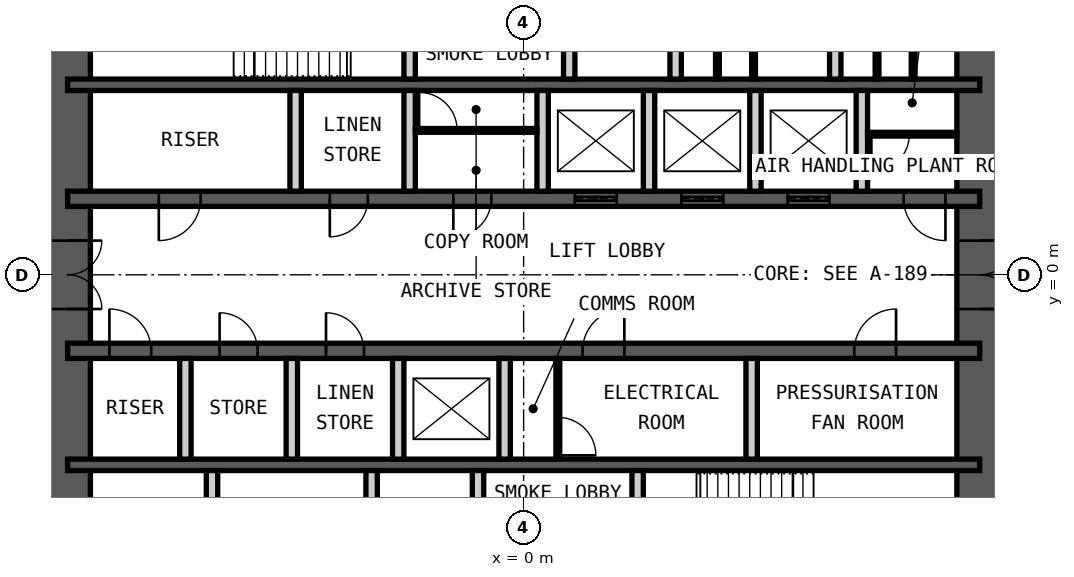
"""IFC4 building model, lengths in metres.
Left out: names, types, materials, properties, quantities, classifications, styles, units other than length and angle.
Written with IfcOpenShell. Run it as: python <this file> out.ifc"""

import sys

from ifc_helpers import new_model, si_unit, direction, frame, frame_2d, origin, place, context, subcontext, project, spatial, rectangle, extrude, element, fill, save


model = new_model("IFC4")
c1 = context("Model", 3, precision=1e-05, world=origin(), true_north=direction((0.0, 1.0)))
c2 = subcontext(c1, "Body", "Model", "MODEL_VIEW")
j1 = project(units=[si_unit("LENGTHUNIT", "METRE"), si_unit("PLANEANGLEUNIT", "RADIAN")], contexts=[c1])
p1 = place(None, origin())
s1 = spatial("IfcSite", under=j1, at=p1, CompositionType="ELEMENT")
p2 = place(p1, origin())
s2 = spatial("IfcBuilding", under=s1, at=p2, CompositionType="ELEMENT")
p3 = place(p2, frame((0.0, 0.0, 209.8)))
s3 = spatial("IfcBuildingStorey", under=s2, at=p3, CompositionType="ELEMENT", Elevation=209.8)
p4 = place(p3, frame((12.0, -9.0, 0.0), z_axis=(0.0, 0.0, 1.0), x_axis=(0.0, 1.0, 0.0)))
e1 = element("IfcWall", 1, at=p4, inside=s3, PredefinedType="SHEAR", context=c2, shape_type="SweptSolid", body=[
    extrude(rectangle(XDim=18.0, YDim=1.2, at=frame_2d((9.0, 0.0))), origin(), (0.0, 0.0, 1.0), 4.2),
])
p5 = place(p4, frame((8.1, 0.0, 0.0)))
e2 = element("IfcOpeningElement", 2, at=p5, cuts=e1, PredefinedType="OPENING", context=c2, shape_type="SweptSolid", body=[
    extrude(rectangle(XDim=1.8, YDim=2.1, at=frame_2d((0.9, 1.05))), frame((0.0, 0.61, 0.0), z_axis=(0.0, -1.0, 0.0), x_axis=(1.0, 0.0, 0.0)), (0.0, 0.0, 1.0), 1.22),
])
p6 = place(p3, frame((-12.0, -9.0, 0.0), z_axis=(0.0, 0.0, 1.0), x_axis=(0.0, 1.0, 0.0)))
e3 = element("IfcWall", 3, at=p6, inside=s3, PredefinedType="SHEAR", context=c2, shape_type="SweptSolid", body=[
    extrude(rectangle(XDim=18.0, YDim=1.2, at=frame_2d((9.0, 0.0))), origin(), (0.0, 0.0, 1.0), 4.2),
])
p7 = place(p6, frame((8.1, 0.0, 0.0)))
e4 = element("IfcOpeningElement", 4, at=p7, cuts=e3, PredefinedType="OPENING", context=c2, shape_type="SweptSolid", body=[
    extrude(rectangle(XDim=1.8, YDim=2.1, at=frame_2d((0.9, 1.05))), frame((0.0, 0.61, 0.0), z_axis=(0.0, -1.0, 0.0), x_axis=(1.0, 0.0, 0.0)), (0.0, 0.0, 1.0), 1.22),
])
p8 = place(p3, frame((-12.0, 5.0, 0.0), z_axis=(0.0, 0.0, 1.0), x_axis=(1.0, 0.0, 0.0)))
e5 = element("IfcWall", 5, at=p8, inside=s3, PredefinedType="SHEAR", context=c2, shape_type="SweptSolid", body=[
    extrude(rectangle(XDim=24.0, YDim=0.3, at=frame_2d((12.0, 0.0))), origin(), (0.0, 0.0, 1.0), 4.2),
])
p9 = place(p3, frame((-12.0, 2.0, 0.0), z_axis=(0.0, 0.0, 1.0), x_axis=(1.0, 0.0, 0.0)))
e6 = element("IfcWall", 6, at=p9, inside=s3, PredefinedType="SHEAR", context=c2, shape_type="SweptSolid", body=[
    extrude(rectangle(XDim=24.0, YDim=0.4, at=frame_2d((12.0, 0.0))), origin(), (0.0, 0.0, 1.0), 4.2),
])
p10 = place(p9, frame((2.4, 0.0, 0.0)))
e7 = element("IfcOpeningElement", 7, at=p10, cuts=e6, PredefinedType="OPENING", context=c2, shape_type="SweptSolid", body=[
    extrude(rectangle(XDim=1.1, YDim=2.1, at=frame_2d((0.55, 1.05))), frame((0.0, 0.21, 0.0), z_axis=(0.0, -1.0, 0.0), x_axis=(1.0, 0.0, 0.0)), (0.0, 0.0, 1.0), 0.42),
])
p11 = place(p9, frame((22.0, 0.0, 0.0)))
e8 = element("IfcOpeningElement", 8, at=p11, cuts=e6, PredefinedType="OPENING", context=c2, shape_type="SweptSolid", body=[
    extrude(rectangle(XDim=1.1, YDim=2.1, at=frame_2d((0.55, 1.05))), frame((0.0, 0.21, 0.0), z_axis=(0.0, -1.0, 0.0), x_axis=(1.0, 0.0, 0.0)), (0.0, 0.0, 1.0), 0.42),
])
p12 = place(p9, frame((10.15, 0.0, 0.0)))
e9 = element("IfcOpeningElement", 9, at=p12, cuts=e6, PredefinedType="OPENING", context=c2, shape_type="SweptSolid", body=[
    extrude(rectangle(XDim=1.0, YDim=2.1, at=frame_2d((0.5, 1.05))), frame((0.0, 0.21, 0.0), z_axis=(0.0, -1.0, 0.0), x_axis=(1.0, 0.0, 0.0)), (0.0, 0.0, 1.0), 0.42),
])
p13 = place(p9, frame((6.9, 0.0, 0.0)))
e10 = element("IfcOpeningElement", 10, at=p13, cuts=e6, PredefinedType="OPENING", context=c2, shape_type="SweptSolid", body=[
    extrude(rectangle(XDim=1.0, YDim=2.1, at=frame_2d((0.5, 1.05))), frame((0.0, 0.21, 0.0), z_axis=(0.0, -1.0, 0.0), x_axis=(1.0, 0.0, 0.0)), (0.0, 0.0, 1.0), 0.42),
])
p14 = place(p9, frame((13.35, 0.0, 0.0)))
e11 = element("IfcOpeningElement", 11, at=p14, cuts=e6, PredefinedType="OPENING", context=c2, shape_type="SweptSolid", body=[
    extrude(rectangle(XDim=1.1, YDim=2.4, at=frame_2d((0.55, 1.2))), frame((0.0, 0.21, 0.0), z_axis=(0.0, -1.0, 0.0), x_axis=(1.0, 0.0, 0.0)), (0.0, 0.0, 1.0), 0.42),
])
p15 = place(p9, frame((16.15, 0.0, 0.0)))
e12 = element("IfcOpeningElement", 12, at=p15, cuts=e6, PredefinedType="OPENING", context=c2, shape_type="SweptSolid", body=[
    extrude(rectangle(XDim=1.1, YDim=2.4, at=frame_2d((0.55, 1.2))), frame((0.0, 0.21, 0.0), z_axis=(0.0, -1.0, 0.0), x_axis=(1.0, 0.0, 0.0)), (0.0, 0.0, 1.0), 0.42),
])
p16 = place(p9, frame((18.95, 0.0, 0.0)))
e13 = element("IfcOpeningElement", 13, at=p16, cuts=e6, PredefinedType="OPENING", context=c2, shape_type="SweptSolid", body=[
    extrude(rectangle(XDim=1.1, YDim=2.4, at=frame_2d((0.55, 1.2))), frame((0.0, 0.21, 0.0), z_axis=(0.0, -1.0, 0.0), x_axis=(1.0, 0.0, 0.0)), (0.0, 0.0, 1.0), 0.42),
])
p17 = place(p3, frame((-12.0, -2.0, 0.0), z_axis=(0.0, 0.0, 1.0), x_axis=(1.0, 0.0, 0.0)))
e14 = element("IfcWall", 14, at=p17, inside=s3, PredefinedType="SHEAR", context=c2, shape_type="SweptSolid", body=[
    extrude(rectangle(XDim=24.0, YDim=0.4, at=frame_2d((12.0, 0.0))), origin(), (0.0, 0.0, 1.0), 4.2),
])
p18 = place(p17, frame((1.1, 0.0, 0.0)))
e15 = element("IfcOpeningElement", 15, at=p18, cuts=e14, PredefinedType="OPENING", context=c2, shape_type="SweptSolid", body=[
    extrude(rectangle(XDim=1.1, YDim=2.1, at=frame_2d((0.55, 1.05))), frame((0.0, 0.21, 0.0), z_axis=(0.0, -1.0, 0.0), x_axis=(1.0, 0.0, 0.0)), (0.0, 0.0, 1.0), 0.42),
])
p19 = place(p17, frame((13.55, 0.0, 0.0)))
e16 = element("IfcOpeningElement", 16, at=p19, cuts=e14, PredefinedType="OPENING", context=c2, shape_type="SweptSolid", body=[
    extrude(rectangle(XDim=1.1, YDim=2.1, at=frame_2d((0.55, 1.05))), frame((0.0, 0.21, 0.0), z_axis=(0.0, -1.0, 0.0), x_axis=(1.0, 0.0, 0.0)), (0.0, 0.0, 1.0), 0.42),
])
p20 = place(p17, frame((20.7, 0.0, 0.0)))
e17 = element("IfcOpeningElement", 17, at=p20, cuts=e14, PredefinedType="OPENING", context=c2, shape_type="SweptSolid", body=[
    extrude(rectangle(XDim=1.1, YDim=2.1, at=frame_2d((0.55, 1.05))), frame((0.0, 0.21, 0.0), z_axis=(0.0, -1.0, 0.0), x_axis=(1.0, 0.0, 0.0)), (0.0, 0.0, 1.0), 0.42),
])
p21 = place(p17, frame((4.0, 0.0, 0.0)))
e18 = element("IfcOpeningElement", 18, at=p21, cuts=e14, PredefinedType="OPENING", context=c2, shape_type="SweptSolid", body=[
    extrude(rectangle(XDim=1.0, YDim=2.1, at=frame_2d((0.5, 1.05))), frame((0.0, 0.21, 0.0), z_axis=(0.0, -1.0, 0.0), x_axis=(1.0, 0.0, 0.0)), (0.0, 0.0, 1.0), 0.42),
])
p22 = place(p17, frame((6.8, 0.0, 0.0)))
e19 = element("IfcOpeningElement", 19, at=p22, cuts=e14, PredefinedType="OPENING", context=c2, shape_type="SweptSolid", body=[
    extrude(rectangle(XDim=1.0, YDim=2.1, at=frame_2d((0.5, 1.05))), frame((0.0, 0.21, 0.0), z_axis=(0.0, -1.0, 0.0), x_axis=(1.0, 0.0, 0.0)), (0.0, 0.0, 1.0), 0.42),
])
p23 = place(p3, frame((-12.0, -5.0, 0.0), z_axis=(0.0, 0.0, 1.0), x_axis=(1.0, 0.0, 0.0)))
e20 = element("IfcWall", 20, at=p23, inside=s3, PredefinedType="SHEAR", context=c2, shape_type="SweptSolid", body=[
    extrude(rectangle(XDim=24.0, YDim=0.3, at=frame_2d((12.0, 0.0))), origin(), (0.0, 0.0, 1.0), 4.2),
])
p24 = place(p3, frame((-3.0, 5.15, 0.0), z_axis=(0.0, 0.0, 1.0), x_axis=(0.0, 1.0, 0.0)))
e21 = element("IfcWall", 21, at=p24, inside=s3, PredefinedType="PARTITIONING", context=c2, shape_type="SweptSolid", body=[
    extrude(rectangle(XDim=3.85, YDim=0.3, at=frame_2d((1.925, 0.0))), origin(), (0.0, 0.0, 1.0), 3.98),
])
p25 = place(p24, frame((1.425, 0.0, 0.0)))
e22 = element("IfcOpeningElement", 22, at=p25, cuts=e21, PredefinedType="OPENING", context=c2, shape_type="SweptSolid", body=[
    extrude(rectangle(XDim=1.0, YDim=2.1, at=frame_2d((0.5, 1.05))), frame((0.0, 0.16, 0.0), z_axis=(0.0, -1.0, 0.0), x_axis=(1.0, 0.0, 0.0)), (0.0, 0.0, 1.0), 0.32),
])
p26 = place(p3, frame((1.2, 5.15, 0.0), z_axis=(0.0, 0.0, 1.0), x_axis=(0.0, 1.0, 0.0)))
e23 = element("IfcWall", 23, at=p26, inside=s3, PredefinedType="PARTITIONING", context=c2, shape_type="SweptSolid", body=[
    extrude(rectangle(XDim=3.85, YDim=0.3, at=frame_2d((1.925, 0.0))), origin(), (0.0, 0.0, 1.0), 3.98),
])
p27 = place(p26, frame((1.375, 0.0, 0.0)))
e24 = element("IfcOpeningElement", 24, at=p27, cuts=e23, PredefinedType="OPENING", context=c2, shape_type="SweptSolid", body=[
    extrude(rectangle(XDim=1.1, YDim=2.4, at=frame_2d((0.55, 1.2))), frame((0.0, 0.16, 0.0), z_axis=(0.0, -1.0, 0.0), x_axis=(1.0, 0.0, 0.0)), (0.0, 0.0, 1.0), 0.32),
])
for number, where, z_axis, x_axis in (
    (25, (4.0, 5.15, 0.0), (0.0, 0.0, 1.0), (0.0, 1.0, 0.0)),
    (26, (8.2, 5.15, 0.0), (0.0, 0.0, 1.0), (0.0, 1.0, 0.0)),
):
    element("IfcWall", number, at=place(p3, frame(where, z_axis=z_axis, x_axis=x_axis)), inside=s3, PredefinedType="PARTITIONING", context=c2, shape_type="SweptSolid", body=[
        extrude(rectangle(XDim=3.85, YDim=0.3, at=frame_2d((1.925, 0.0))), origin(), (0.0, 0.0, 1.0), 3.98),
    ])
for number, where, z_axis, x_axis in (
    (27, (-6.0, 2.2, 0.0), (0.0, 0.0, 1.0), (0.0, 1.0, 0.0)),
    (28, (-3.0, 2.2, 0.0), (0.0, 0.0, 1.0), (0.0, 1.0, 0.0)),
    (29, (0.5, 2.2, 0.0), (0.0, 0.0, 1.0), (0.0, 1.0, 0.0)),
    (30, (3.3, 2.2, 0.0), (0.0, 0.0, 1.0), (0.0, 1.0, 0.0)),
    (31, (6.1, 2.2, 0.0), (0.0, 0.0, 1.0), (0.0, 1.0, 0.0)),
    (32, (8.9, 2.2, 0.0), (0.0, 0.0, 1.0), (0.0, 1.0, 0.0)),
    (33, (-8.9, -4.85, 0.0), (0.0, 0.0, 1.0), (0.0, 1.0, 0.0)),
    (34, (-6.1, -4.85, 0.0), (0.0, 0.0, 1.0), (0.0, 1.0, 0.0)),
    (35, (-3.3, -4.85, 0.0), (0.0, 0.0, 1.0), (0.0, 1.0, 0.0)),
    (36, (-0.5, -4.85, 0.0), (0.0, 0.0, 1.0), (0.0, 1.0, 0.0)),
    (37, (6.0, -4.85, 0.0), (0.0, 0.0, 1.0), (0.0, 1.0, 0.0)),
):
    element("IfcWall", number, at=place(p3, frame(where, z_axis=z_axis, x_axis=x_axis)), inside=s3, PredefinedType="PARTITIONING", context=c2, shape_type="SweptSolid", body=[
        extrude(rectangle(XDim=2.65, YDim=0.3, at=frame_2d((1.325, 0.0))), origin(), (0.0, 0.0, 1.0), 3.98),
    ])
for number, where, z_axis, x_axis in (
    (38, (-8.2, -9.0, 0.0), (0.0, 0.0, 1.0), (0.0, 1.0, 0.0)),
    (39, (-4.0, -9.0, 0.0), (0.0, 0.0, 1.0), (0.0, 1.0, 0.0)),
):
    element("IfcWall", number, at=place(p3, frame(where, z_axis=z_axis, x_axis=x_axis)), inside=s3, PredefinedType="PARTITIONING", context=c2, shape_type="SweptSolid", body=[
        extrude(rectangle(XDim=3.85, YDim=0.3, at=frame_2d((1.925, 0.0))), origin(), (0.0, 0.0, 1.0), 3.98),
    ])
p28 = place(p3, frame((-1.2, -9.0, 0.0), z_axis=(0.0, 0.0, 1.0), x_axis=(0.0, 1.0, 0.0)))
e40 = element("IfcWall", 40, at=p28, inside=s3, PredefinedType="PARTITIONING", context=c2, shape_type="SweptSolid", body=[
    extrude(rectangle(XDim=3.85, YDim=0.3, at=frame_2d((1.925, 0.0))), origin(), (0.0, 0.0, 1.0), 3.98),
])
p29 = place(p28, frame((1.375, 0.0, 0.0)))
e41 = element("IfcOpeningElement", 41, at=p29, cuts=e40, PredefinedType="OPENING", context=c2, shape_type="SweptSolid", body=[
    extrude(rectangle(XDim=1.1, YDim=2.4, at=frame_2d((0.55, 1.2))), frame((0.0, 0.16, 0.0), z_axis=(0.0, -1.0, 0.0), x_axis=(1.0, 0.0, 0.0)), (0.0, 0.0, 1.0), 0.32),
])
p30 = place(p3, frame((3.0, -9.0, 0.0), z_axis=(0.0, 0.0, 1.0), x_axis=(0.0, 1.0, 0.0)))
e42 = element("IfcWall", 42, at=p30, inside=s3, PredefinedType="PARTITIONING", context=c2, shape_type="SweptSolid", body=[
    extrude(rectangle(XDim=3.85, YDim=0.3, at=frame_2d((1.925, 0.0))), origin(), (0.0, 0.0, 1.0), 3.98),
])
p31 = place(p30, frame((1.425, 0.0, 0.0)))
e43 = element("IfcOpeningElement", 43, at=p31, cuts=e42, PredefinedType="OPENING", context=c2, shape_type="SweptSolid", body=[
    extrude(rectangle(XDim=1.0, YDim=2.1, at=frame_2d((0.5, 1.05))), frame((0.0, 0.16, 0.0), z_axis=(0.0, -1.0, 0.0), x_axis=(1.0, 0.0, 0.0)), (0.0, 0.0, 1.0), 0.32),
])
p32 = place(p3, frame((-2.85, 3.8, 0.0), z_axis=(0.0, 0.0, 1.0), x_axis=(1.0, 0.0, 0.0)))
e44 = element("IfcWall", 44, at=p32, inside=s3, PredefinedType="PARTITIONING", context=c2, shape_type="SweptSolid", body=[
    extrude(rectangle(XDim=3.2, YDim=0.1, at=frame_2d((1.6, 0.0))), origin(), (0.0, 0.0, 1.0), 3.98),
])
p33 = place(p32, frame((0.1, 0.0, 0.0)))
e45 = element("IfcOpeningElement", 45, at=p33, cuts=e44, PredefinedType="OPENING", context=c2, shape_type="SweptSolid", body=[
    extrude(rectangle(XDim=1.0, YDim=2.4, at=frame_2d((0.5, 1.2))), frame((0.0, 0.06, 0.0), z_axis=(0.0, -1.0, 0.0), x_axis=(1.0, 0.0, 0.0)), (0.0, 0.0, 1.0), 0.12),
])
p34 = place(p3, frame((0.9, -4.85, 0.0), z_axis=(0.0, 0.0, 1.0), x_axis=(0.0, 1.0, 0.0)))
e46 = element("IfcWall", 46, at=p34, inside=s3, PredefinedType="PARTITIONING", context=c2, shape_type="SweptSolid", body=[
    extrude(rectangle(XDim=2.65, YDim=0.1, at=frame_2d((1.325, 0.0))), origin(), (0.0, 0.0, 1.0), 3.98),
])
p35 = place(p34, frame((0.1, 0.0, 0.0)))
e47 = element("IfcOpeningElement", 47, at=p35, cuts=e46, PredefinedType="OPENING", context=c2, shape_type="SweptSolid", body=[
    extrude(rectangle(XDim=1.0, YDim=2.4, at=frame_2d((0.5, 1.2))), frame((0.0, 0.06, 0.0), z_axis=(0.0, -1.0, 0.0), x_axis=(1.0, 0.0, 0.0)), (0.0, 0.0, 1.0), 0.12),
])
p36 = place(p3, frame((9.05, 3.7, 0.0), z_axis=(0.0, 0.0, 1.0), x_axis=(1.0, 0.0, 0.0)))
e48 = element("IfcWall", 48, at=p36, inside=s3, PredefinedType="PARTITIONING", context=c2, shape_type="SweptSolid", body=[
    extrude(rectangle(XDim=2.35, YDim=0.1, at=frame_2d((1.175, 0.0))), origin(), (0.0, 0.0, 1.0), 3.98),
])
p37 = place(p36, frame((0.1, 0.0, 0.0)))
e49 = element("IfcOpeningElement", 49, at=p37, cuts=e48, PredefinedType="OPENING", context=c2, shape_type="SweptSolid", body=[
    extrude(rectangle(XDim=1.0, YDim=2.4, at=frame_2d((0.5, 1.2))), frame((0.0, 0.06, 0.0), z_axis=(0.0, -1.0, 0.0), x_axis=(1.0, 0.0, 0.0)), (0.0, 0.0, 1.0), 0.12),
])
for number, where, z_axis, x_axis in (
    (50, (5.1, 5.15, 0.0), (0.0, 0.0, 1.0), (0.0, 1.0, 0.0)),
    (51, (6.05, 5.15, 0.0), (0.0, 0.0, 1.0), (0.0, 1.0, 0.0)),
    (52, (9.3, 5.15, 0.0), (0.0, 0.0, 1.0), (0.0, 1.0, 0.0)),
    (53, (10.25, 5.15, 0.0), (0.0, 0.0, 1.0), (0.0, 1.0, 0.0)),
):
    element("IfcWall", number, at=place(p3, frame(where, z_axis=z_axis, x_axis=x_axis)), inside=s3, PredefinedType="PARTITIONING", context=c2, shape_type="SweptSolid", body=[
        extrude(rectangle(XDim=1.5, YDim=0.1, at=frame_2d((0.75, 0.0))), origin(), (0.0, 0.0, 1.0), 2.1),
    ])
p38 = place(p10, origin())
e54 = element("IfcDoor", 54, at=p38, inside=s3, OperationType="SINGLE_SWING_LEFT", PredefinedType="DOOR", context=c2, shape_type="SweptSolid", body=[
    extrude(rectangle(XDim=1.1, YDim=2.1, at=frame_2d((0.55, 1.05))), frame((0.0, 0.025, 0.0), z_axis=(0.0, -1.0, 0.0), x_axis=(1.0, 0.0, 0.0)), (0.0, 0.0, 1.0), 0.05),
])
fill(e7, e54)
p39 = place(p18, origin())
e55 = element("IfcDoor", 55, at=p39, inside=s3, OperationType="SINGLE_SWING_RIGHT", PredefinedType="DOOR", context=c2, shape_type="SweptSolid", body=[
    extrude(rectangle(XDim=1.1, YDim=2.1, at=frame_2d((0.55, 1.05))), frame((0.0, 0.025, 0.0), z_axis=(0.0, -1.0, 0.0), x_axis=(1.0, 0.0, 0.0)), (0.0, 0.0, 1.0), 0.05),
])
fill(e15, e55)
p40 = place(p11, origin())
e56 = element("IfcDoor", 56, at=p40, inside=s3, OperationType="SINGLE_SWING_RIGHT", PredefinedType="DOOR", context=c2, shape_type="SweptSolid", body=[
    extrude(rectangle(XDim=1.1, YDim=2.1, at=frame_2d((0.55, 1.05))), frame((0.0, 0.025, 0.0), z_axis=(0.0, -1.0, 0.0), x_axis=(1.0, 0.0, 0.0)), (0.0, 0.0, 1.0), 0.05),
])
fill(e8, e56)
p41 = place(p12, origin())
e57 = element("IfcDoor", 57, at=p41, inside=s3, OperationType="SINGLE_SWING_LEFT", PredefinedType="DOOR", context=c2, shape_type="SweptSolid", body=[
    extrude(rectangle(XDim=1.0, YDim=2.1, at=frame_2d((0.5, 1.05))), frame((0.0, 0.025, 0.0), z_axis=(0.0, -1.0, 0.0), x_axis=(1.0, 0.0, 0.0)), (0.0, 0.0, 1.0), 0.05),
])
fill(e9, e57)
p42 = place(p19, origin())
e58 = element("IfcDoor", 58, at=p42, inside=s3, OperationType="SINGLE_SWING_LEFT", PredefinedType="DOOR", context=c2, shape_type="SweptSolid", body=[
    extrude(rectangle(XDim=1.1, YDim=2.1, at=frame_2d((0.55, 1.05))), frame((0.0, 0.025, 0.0), z_axis=(0.0, -1.0, 0.0), x_axis=(1.0, 0.0, 0.0)), (0.0, 0.0, 1.0), 0.05),
])
fill(e16, e58)
p43 = place(p20, origin())
e59 = element("IfcDoor", 59, at=p43, inside=s3, OperationType="SINGLE_SWING_LEFT", PredefinedType="DOOR", context=c2, shape_type="SweptSolid", body=[
    extrude(rectangle(XDim=1.1, YDim=2.1, at=frame_2d((0.55, 1.05))), frame((0.0, 0.025, 0.0), z_axis=(0.0, -1.0, 0.0), x_axis=(1.0, 0.0, 0.0)), (0.0, 0.0, 1.0), 0.05),
])
fill(e17, e59)
p44 = place(p5, origin())
e60 = element("IfcDoor", 60, at=p44, inside=s3, OperationType="DOUBLE_DOOR_DOUBLE_SWING", PredefinedType="DOOR", context=c2, shape_type="SweptSolid", body=[
    extrude(rectangle(XDim=1.8, YDim=2.1, at=frame_2d((0.9, 1.05))), frame((0.0, 0.025, 0.0), z_axis=(0.0, -1.0, 0.0), x_axis=(1.0, 0.0, 0.0)), (0.0, 0.0, 1.0), 0.05),
])
fill(e2, e60)
p45 = place(p7, origin())
e61 = element("IfcDoor", 61, at=p45, inside=s3, OperationType="DOUBLE_DOOR_DOUBLE_SWING", PredefinedType="DOOR", context=c2, shape_type="SweptSolid", body=[
    extrude(rectangle(XDim=1.8, YDim=2.1, at=frame_2d((0.9, 1.05))), frame((0.0, 0.025, 0.0), z_axis=(0.0, -1.0, 0.0), x_axis=(1.0, 0.0, 0.0)), (0.0, 0.0, 1.0), 0.05),
])
fill(e4, e61)
p46 = place(p13, origin())
e62 = element("IfcDoor", 62, at=p46, inside=s3, OperationType="SINGLE_SWING_LEFT", PredefinedType="DOOR", context=c2, shape_type="SweptSolid", body=[
    extrude(rectangle(XDim=1.0, YDim=2.1, at=frame_2d((0.5, 1.05))), frame((0.0, 0.025, 0.0), z_axis=(0.0, -1.0, 0.0), x_axis=(1.0, 0.0, 0.0)), (0.0, 0.0, 1.0), 0.05),
])
fill(e10, e62)
p47 = place(p14, origin())
e63 = element("IfcDoor", 63, at=p47, inside=s3, OperationType="DOUBLE_DOOR_SLIDING", PredefinedType="DOOR", context=c2, shape_type="SweptSolid", body=[
    extrude(rectangle(XDim=1.1, YDim=2.4, at=frame_2d((0.55, 1.2))), frame((0.0, 0.025, 0.0), z_axis=(0.0, -1.0, 0.0), x_axis=(1.0, 0.0, 0.0)), (0.0, 0.0, 1.0), 0.05),
])
fill(e11, e63)
p48 = place(p15, origin())
e64 = element("IfcDoor", 64, at=p48, inside=s3, OperationType="DOUBLE_DOOR_SLIDING", PredefinedType="DOOR", context=c2, shape_type="SweptSolid", body=[
    extrude(rectangle(XDim=1.1, YDim=2.4, at=frame_2d((0.55, 1.2))), frame((0.0, 0.025, 0.0), z_axis=(0.0, -1.0, 0.0), x_axis=(1.0, 0.0, 0.0)), (0.0, 0.0, 1.0), 0.05),
])
fill(e12, e64)
p49 = place(p16, origin())
e65 = element("IfcDoor", 65, at=p49, inside=s3, OperationType="DOUBLE_DOOR_SLIDING", PredefinedType="DOOR", context=c2, shape_type="SweptSolid", body=[
    extrude(rectangle(XDim=1.1, YDim=2.4, at=frame_2d((0.55, 1.2))), frame((0.0, 0.025, 0.0), z_axis=(0.0, -1.0, 0.0), x_axis=(1.0, 0.0, 0.0)), (0.0, 0.0, 1.0), 0.05),
])
fill(e13, e65)
p50 = place(p21, origin())
e66 = element("IfcDoor", 66, at=p50, inside=s3, OperationType="SINGLE_SWING_RIGHT", PredefinedType="DOOR", context=c2, shape_type="SweptSolid", body=[
    extrude(rectangle(XDim=1.0, YDim=2.1, at=frame_2d((0.5, 1.05))), frame((0.0, 0.025, 0.0), z_axis=(0.0, -1.0, 0.0), x_axis=(1.0, 0.0, 0.0)), (0.0, 0.0, 1.0), 0.05),
])
fill(e18, e66)
p51 = place(p22, origin())
e67 = element("IfcDoor", 67, at=p51, inside=s3, OperationType="SINGLE_SWING_RIGHT", PredefinedType="DOOR", context=c2, shape_type="SweptSolid", body=[
    extrude(rectangle(XDim=1.0, YDim=2.1, at=frame_2d((0.5, 1.05))), frame((0.0, 0.025, 0.0), z_axis=(0.0, -1.0, 0.0), x_axis=(1.0, 0.0, 0.0)), (0.0, 0.0, 1.0), 0.05),
])
fill(e19, e67)
p52 = place(p33, origin())
e68 = element("IfcDoor", 68, at=p52, inside=s3, OperationType="SINGLE_SWING_RIGHT", PredefinedType="DOOR", context=c2, shape_type="SweptSolid", body=[
    extrude(rectangle(XDim=1.0, YDim=2.4, at=frame_2d((0.5, 1.2))), frame((0.0, 0.025, 0.0), z_axis=(0.0, -1.0, 0.0), x_axis=(1.0, 0.0, 0.0)), (0.0, 0.0, 1.0), 0.05),
])
fill(e45, e68)
p53 = place(p35, origin())
e69 = element("IfcDoor", 69, at=p53, inside=s3, OperationType="SINGLE_SWING_LEFT", PredefinedType="DOOR", context=c2, shape_type="SweptSolid", body=[
    extrude(rectangle(XDim=1.0, YDim=2.4, at=frame_2d((0.5, 1.2))), frame((0.0, 0.025, 0.0), z_axis=(0.0, -1.0, 0.0), x_axis=(1.0, 0.0, 0.0)), (0.0, 0.0, 1.0), 0.05),
])
fill(e47, e69)
p54 = place(p37, origin())
e70 = element("IfcDoor", 70, at=p54, inside=s3, OperationType="SINGLE_SWING_LEFT", PredefinedType="DOOR", context=c2, shape_type="SweptSolid", body=[
    extrude(rectangle(XDim=1.0, YDim=2.4, at=frame_2d((0.5, 1.2))), frame((0.0, 0.025, 0.0), z_axis=(0.0, -1.0, 0.0), x_axis=(1.0, 0.0, 0.0)), (0.0, 0.0, 1.0), 0.05),
])
fill(e49, e70)
save(model, sys.argv[1])
